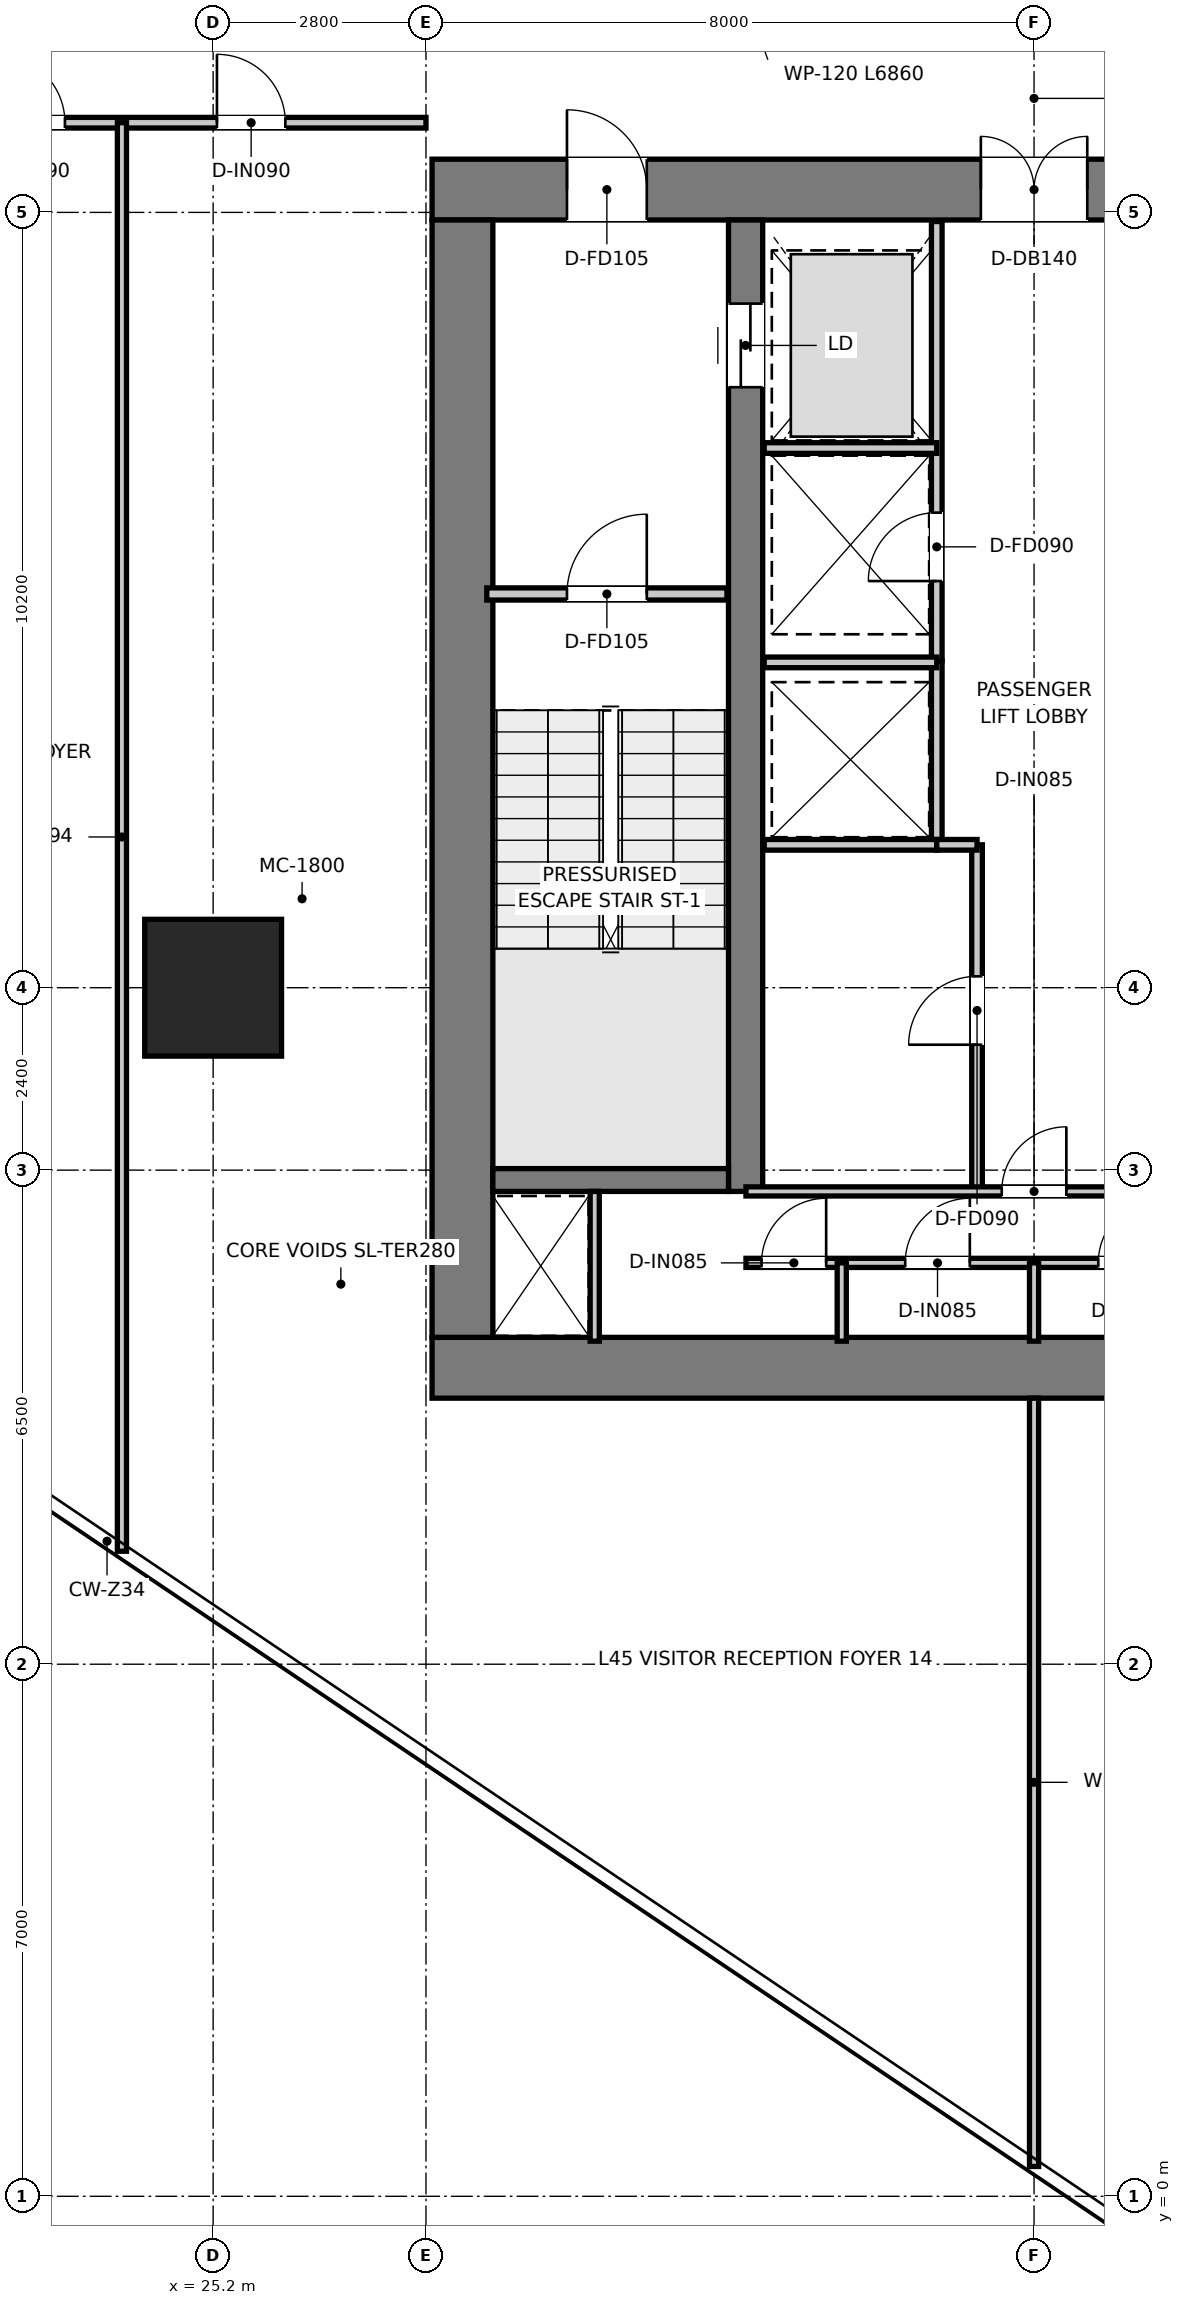
"""IFC4 building model, lengths in metres.
Left out: names, types, materials, properties, quantities, classifications, styles, units other than length and angle.
Written with IfcOpenShell. Run it as: python <this file> out.ifc"""

import sys

from ifc_helpers import new_model, si_unit, direction, frame, frame_2d, origin, origin_2d, place, context, subcontext, project, spatial, rectangle, extrude, source, transform, mapped, element, fill, save


model = new_model("IFC4")
c1 = context("Model", 3, precision=1e-05, world=origin(), true_north=direction((0.0, 1.0)))
c2 = subcontext(c1, "Body", "Model", "MODEL_VIEW")
j1 = project(units=[si_unit("LENGTHUNIT", "METRE"), si_unit("PLANEANGLEUNIT", "RADIAN")], contexts=[c1])
p1 = place(None, origin())
s1 = spatial("IfcSite", under=j1, at=p1, CompositionType="ELEMENT")
p2 = place(p1, origin())
s2 = spatial("IfcBuilding", under=s1, at=p2, CompositionType="ELEMENT")
p3 = place(p2, frame((0.0, 0.0, 185.7)))
s3 = spatial("IfcBuildingStorey", under=s2, at=p3, CompositionType="ELEMENT", Elevation=185.7)
p4 = place(p3, frame((28.08, 10.9, 0.0), z_axis=(0.0, 0.0, 1.0), x_axis=(1.0, 0.0, 0.0)))
e1 = element("IfcWall", 1, at=p4, inside=s3, PredefinedType="SHEAR", context=c2, shape_type="SweptSolid", body=[
    extrude(rectangle(XDim=15.84, YDim=0.8, at=frame_2d((7.92, 0.0))), origin(), (0.0, 0.0, 1.0), 3.95),
])
p5 = place(p3, frame((28.08, 26.4, 0.0), z_axis=(0.0, 0.0, 1.0), x_axis=(1.0, 0.0, 0.0)))
e2 = element("IfcWall", 2, at=p5, inside=s3, PredefinedType="SHEAR", context=c2, shape_type="SweptSolid", body=[
    extrude(rectangle(XDim=15.84, YDim=0.8, at=frame_2d((7.92, 0.0))), origin(), (0.0, 0.0, 1.0), 3.95),
])
p6 = place(p5, frame((7.22, 0.0, 0.0)))
e3 = element("IfcOpeningElement", 3, at=p6, cuts=e2, PredefinedType="OPENING", context=c2, shape_type="SweptSolid", body=[
    extrude(rectangle(XDim=1.4, YDim=2.2, at=frame_2d((0.7, 1.1))), frame((0.0, 0.41, 0.0), z_axis=(0.0, -1.0, 0.0), x_axis=(1.0, 0.0, 0.0)), (0.0, 0.0, 1.0), 0.82),
])
p7 = place(p5, frame((1.775, 0.0, 0.0)))
e4 = element("IfcOpeningElement", 4, at=p7, cuts=e2, PredefinedType="OPENING", context=c2, shape_type="SweptSolid", body=[
    extrude(rectangle(XDim=1.05, YDim=2.1, at=frame_2d((0.525, 1.05))), frame((0.0, 0.41, 0.0), z_axis=(0.0, -1.0, 0.0), x_axis=(1.0, 0.0, 0.0)), (0.0, 0.0, 1.0), 0.82),
])
p8 = place(p5, frame((13.015, 0.0, 0.0)))
e5 = element("IfcOpeningElement", 5, at=p8, cuts=e2, PredefinedType="OPENING", context=c2, shape_type="SweptSolid", body=[
    extrude(rectangle(XDim=1.05, YDim=2.1, at=frame_2d((0.525, 1.05))), frame((0.0, 0.41, 0.0), z_axis=(0.0, -1.0, 0.0), x_axis=(1.0, 0.0, 0.0)), (0.0, 0.0, 1.0), 0.82),
])
p9 = place(p3, frame((28.48, 11.3, 0.0), z_axis=(0.0, 0.0, 1.0), x_axis=(0.0, 1.0, 0.0)))
e6 = element("IfcWall", 6, at=p9, inside=s3, PredefinedType="SHEAR", context=c2, shape_type="SweptSolid", body=[
    extrude(rectangle(XDim=14.7, YDim=0.8, at=frame_2d((7.35, 0.0))), origin(), (0.0, 0.0, 1.0), 3.95),
])
p10 = place(p3, frame((32.205, 13.22, 0.0), z_axis=(0.0, 0.0, 1.0), x_axis=(0.0, 1.0, 0.0)))
e7 = element("IfcWall", 7, at=p10, inside=s3, PredefinedType="SHEAR", context=c2, shape_type="SweptSolid", body=[
    extrude(rectangle(XDim=12.78, YDim=0.45, at=frame_2d((6.39, 0.0))), origin(), (0.0, 0.0, 1.0), 3.95),
])
p11 = place(p10, frame((10.58, 0.0, 0.0)))
e8 = element("IfcOpeningElement", 8, at=p11, cuts=e7, PredefinedType="OPENING", context=c2, shape_type="SweptSolid", body=[
    extrude(rectangle(XDim=1.1, YDim=2.15, at=frame_2d((0.55, 1.075))), frame((0.0, 0.235, 0.0), z_axis=(0.0, -1.0, 0.0), x_axis=(1.0, 0.0, 0.0)), (0.0, 0.0, 1.0), 0.47),
])
p12 = place(p3, frame((28.88, 13.37, 0.0), z_axis=(0.0, 0.0, 1.0), x_axis=(1.0, 0.0, 0.0)))
e9 = element("IfcWall", 9, at=p12, inside=s3, PredefinedType="SHEAR", context=c2, shape_type="SweptSolid", body=[
    extrude(rectangle(XDim=3.1, YDim=0.3, at=frame_2d((1.55, 0.0))), origin(), (0.0, 0.0, 1.0), 3.95),
])
m1 = source(origin(), c2, "Body", "SweptSolid", [
    extrude(rectangle(XDim=1.8, YDim=1.8, at=origin_2d()), origin(), (0.0, 0.0, 1.0), 3.95),
])
p13 = place(p3, frame((25.2, 15.9, 0.0), z_axis=(0.0, 0.0, 1.0), x_axis=(1.0, 0.0, 0.0)))
e10 = element("IfcColumn", 10, at=p13, inside=s3, PredefinedType="USERDEFINED", context=c2, shape_type="MappedRepresentation", body=[
    mapped(m1, transform((0.0, 0.0, 0.0), x_axis=(1.0, 0.0, 0.0), y_axis=(0.0, 1.0, 0.0), z_axis=(0.0, 0.0, 1.0), scale=1.0)),
])
p14 = place(p3, frame((28.8, 21.08, 0.0), z_axis=(0.0, 0.0, 1.0), x_axis=(1.0, 0.0, 0.0)))
e11 = element("IfcWall", 11, at=p14, inside=s3, PredefinedType="PARTITIONING", context=c2, shape_type="SweptSolid", body=[
    extrude(rectangle(XDim=3.16, YDim=0.16, at=frame_2d((1.58, 0.0))), origin(), (0.0, 0.0, 1.0), 3.67),
])
p15 = place(p14, frame((1.055, 0.0, 0.0)))
e12 = element("IfcOpeningElement", 12, at=p15, cuts=e11, PredefinedType="OPENING", context=c2, shape_type="SweptSolid", body=[
    extrude(rectangle(XDim=1.05, YDim=2.1, at=frame_2d((0.525, 1.05))), frame((0.0, 0.09, 0.0), z_axis=(0.0, -1.0, 0.0), x_axis=(1.0, 0.0, 0.0)), (0.0, 0.0, 1.0), 0.18),
])
p16 = place(p3, frame((34.72, 20.2, 0.0), z_axis=(0.0, 0.0, 1.0), x_axis=(0.0, 1.0, 0.0)))
e13 = element("IfcWall", 13, at=p16, inside=s3, PredefinedType="PARTITIONING", context=c2, shape_type="SweptSolid", body=[
    extrude(rectangle(XDim=5.78, YDim=0.14, at=frame_2d((2.89, 0.0))), origin(), (0.0, 0.0, 1.0), 2.67),
])
p17 = place(p16, frame((1.05, 0.0, 0.0)))
e14 = element("IfcOpeningElement", 14, at=p17, cuts=e13, PredefinedType="OPENING", context=c2, shape_type="SweptSolid", body=[
    extrude(rectangle(XDim=0.9, YDim=2.1, at=frame_2d((0.45, 1.05))), frame((0.0, 0.08, 0.0), z_axis=(0.0, -1.0, 0.0), x_axis=(1.0, 0.0, 0.0)), (0.0, 0.0, 1.0), 0.16),
])
p18 = place(p3, frame((32.45, 23.0, 0.0), z_axis=(0.0, 0.0, 1.0), x_axis=(1.0, 0.0, 0.0)))
e15 = element("IfcWall", 15, at=p18, inside=s3, PredefinedType="PARTITIONING", context=c2, shape_type="SweptSolid", body=[
    extrude(rectangle(XDim=2.27, YDim=0.14, at=frame_2d((1.135, 0.0))), origin(), (0.0, 0.0, 1.0), 2.67),
])
p19 = place(p3, frame((34.72, 17.78, 0.0), z_axis=(0.0, 0.0, 1.0), x_axis=(0.0, 1.0, 0.0)))
e16 = element("IfcWall", 16, at=p19, inside=s3, PredefinedType="PARTITIONING", context=c2, shape_type="SweptSolid", body=[
    extrude(rectangle(XDim=2.42, YDim=0.14, at=frame_2d((1.21, 0.0))), origin(), (0.0, 0.0, 1.0), 3.67),
])
for number, where, z_axis, x_axis in (
    (17, (32.45, 17.78, 0.0), (0.0, 0.0, 1.0), (1.0, 0.0, 0.0)),
    (18, (32.45, 20.18, 0.0), (0.0, 0.0, 1.0), (1.0, 0.0, 0.0)),
):
    element("IfcWall", number, at=place(p3, frame(where, z_axis=z_axis, x_axis=x_axis)), inside=s3, PredefinedType="PARTITIONING", context=c2, shape_type="SweptSolid", body=[
        extrude(rectangle(XDim=2.27, YDim=0.14, at=frame_2d((1.135, 0.0))), origin(), (0.0, 0.0, 1.0), 3.67),
    ])
p20 = place(p3, frame((35.25, 13.22, 0.0), z_axis=(0.0, 0.0, 1.0), x_axis=(0.0, 1.0, 0.0)))
e19 = element("IfcWall", 19, at=p20, inside=s3, PredefinedType="PARTITIONING", context=c2, shape_type="SweptSolid", body=[
    extrude(rectangle(XDim=4.56, YDim=0.14, at=frame_2d((2.28, 0.0))), origin(), (0.0, 0.0, 1.0), 3.67),
])
p21 = place(p20, frame((1.93, 0.0, 0.0)))
e20 = element("IfcOpeningElement", 20, at=p21, cuts=e19, PredefinedType="OPENING", context=c2, shape_type="SweptSolid", body=[
    extrude(rectangle(XDim=0.9, YDim=2.1, at=frame_2d((0.45, 1.05))), frame((0.0, 0.08, 0.0), z_axis=(0.0, -1.0, 0.0), x_axis=(1.0, 0.0, 0.0)), (0.0, 0.0, 1.0), 0.16),
])
p22 = place(p3, frame((34.72, 17.78, 0.0), z_axis=(0.0, 0.0, 1.0), x_axis=(1.0, 0.0, 0.0)))
e21 = element("IfcWall", 21, at=p22, inside=s3, PredefinedType="PARTITIONING", context=c2, shape_type="SweptSolid", body=[
    extrude(rectangle(XDim=0.53, YDim=0.14, at=frame_2d((0.265, 0.0))), origin(), (0.0, 0.0, 1.0), 3.67),
])
p23 = place(p3, frame((30.22, 11.25, 0.0), z_axis=(0.0, 0.0, 1.0), x_axis=(0.0, 1.0, 0.0)))
e22 = element("IfcWall", 22, at=p23, inside=s3, PredefinedType="PARTITIONING", context=c2, shape_type="SweptSolid", body=[
    extrude(rectangle(XDim=1.97, YDim=0.12, at=frame_2d((0.985, 0.0))), origin(), (0.0, 0.0, 1.0), 3.67),
])
p24 = place(p3, frame((32.21, 13.22, 0.0), z_axis=(0.0, 0.0, 1.0), x_axis=(1.0, 0.0, 0.0)))
e23 = element("IfcWall", 23, at=p24, inside=s3, PredefinedType="PARTITIONING", context=c2, shape_type="SweptSolid", body=[
    extrude(rectangle(XDim=7.58, YDim=0.12, at=frame_2d((3.79, 0.0))), origin(), (0.0, 0.0, 1.0), 3.67),
])
p25 = place(p24, frame((3.365, 0.0, 0.0)))
e24 = element("IfcOpeningElement", 24, at=p25, cuts=e23, PredefinedType="OPENING", context=c2, shape_type="SweptSolid", body=[
    extrude(rectangle(XDim=0.85, YDim=2.1, at=frame_2d((0.425, 1.05))), frame((0.0, 0.07, 0.0), z_axis=(0.0, -1.0, 0.0), x_axis=(1.0, 0.0, 0.0)), (0.0, 0.0, 1.0), 0.14),
])
p26 = place(p3, frame((32.21, 12.28, 0.0), z_axis=(0.0, 0.0, 1.0), x_axis=(1.0, 0.0, 0.0)))
e25 = element("IfcWall", 25, at=p26, inside=s3, PredefinedType="PARTITIONING", context=c2, shape_type="SweptSolid", body=[
    extrude(rectangle(XDim=7.58, YDim=0.12, at=frame_2d((3.79, 0.0))), origin(), (0.0, 0.0, 1.0), 3.67),
])
p27 = place(p26, frame((0.205, 0.0, 0.0)))
e26 = element("IfcOpeningElement", 26, at=p27, cuts=e25, PredefinedType="OPENING", context=c2, shape_type="SweptSolid", body=[
    extrude(rectangle(XDim=0.85, YDim=2.1, at=frame_2d((0.425, 1.05))), frame((0.0, 0.07, 0.0), z_axis=(0.0, -1.0, 0.0), x_axis=(1.0, 0.0, 0.0)), (0.0, 0.0, 1.0), 0.14),
])
p28 = place(p26, frame((2.095, 0.0, 0.0)))
e27 = element("IfcOpeningElement", 27, at=p28, cuts=e25, PredefinedType="OPENING", context=c2, shape_type="SweptSolid", body=[
    extrude(rectangle(XDim=0.85, YDim=2.1, at=frame_2d((0.425, 1.05))), frame((0.0, 0.07, 0.0), z_axis=(0.0, -1.0, 0.0), x_axis=(1.0, 0.0, 0.0)), (0.0, 0.0, 1.0), 0.14),
])
p29 = place(p26, frame((4.635, 0.0, 0.0)))
e28 = element("IfcOpeningElement", 28, at=p29, cuts=e25, PredefinedType="OPENING", context=c2, shape_type="SweptSolid", body=[
    extrude(rectangle(XDim=0.85, YDim=2.1, at=frame_2d((0.425, 1.05))), frame((0.0, 0.07, 0.0), z_axis=(0.0, -1.0, 0.0), x_axis=(1.0, 0.0, 0.0)), (0.0, 0.0, 1.0), 0.14),
])
p30 = place(p26, frame((6.525, 0.0, 0.0)))
e29 = element("IfcOpeningElement", 29, at=p30, cuts=e25, PredefinedType="OPENING", context=c2, shape_type="SweptSolid", body=[
    extrude(rectangle(XDim=0.85, YDim=2.1, at=frame_2d((0.425, 1.05))), frame((0.0, 0.07, 0.0), z_axis=(0.0, -1.0, 0.0), x_axis=(1.0, 0.0, 0.0)), (0.0, 0.0, 1.0), 0.14),
])
for number, where, z_axis, x_axis in (
    (30, (33.47, 11.25, 0.0), (0.0, 0.0, 1.0), (0.0, 1.0, 0.0)),
    (31, (36.0, 11.25, 0.0), (0.0, 0.0, 1.0), (0.0, 1.0, 0.0)),
):
    element("IfcWall", number, at=place(p3, frame(where, z_axis=z_axis, x_axis=x_axis)), inside=s3, PredefinedType="PARTITIONING", context=c2, shape_type="SweptSolid", body=[
        extrude(rectangle(XDim=1.03, YDim=0.12, at=frame_2d((0.515, 0.0))), origin(), (0.0, 0.0, 1.0), 3.67),
    ])
p31 = place(p3, frame((10.083, 27.28, 0.0), z_axis=(0.0, 0.0, 1.0), x_axis=(1.0, 0.0, 0.0)))
e32 = element("IfcWall", 32, at=p31, inside=s3, PredefinedType="PARTITIONING", context=c2, shape_type="SweptSolid", body=[
    extrude(rectangle(XDim=17.917, YDim=0.14, at=frame_2d((8.958, 0.0))), origin(), (0.0, 0.0, 1.0), 3.03),
])
p32 = place(p31, frame((3.677, 0.0, 0.0)))
e33 = element("IfcOpeningElement", 33, at=p32, cuts=e32, PredefinedType="OPENING", context=c2, shape_type="SweptSolid", body=[
    extrude(rectangle(XDim=0.9, YDim=2.1, at=frame_2d((0.45, 1.05))), frame((0.0, 0.08, 0.0), z_axis=(0.0, -1.0, 0.0), x_axis=(1.0, 0.0, 0.0)), (0.0, 0.0, 1.0), 0.16),
])
p33 = place(p31, frame((12.266, 0.0, 0.0)))
e34 = element("IfcOpeningElement", 34, at=p33, cuts=e32, PredefinedType="OPENING", context=c2, shape_type="SweptSolid", body=[
    extrude(rectangle(XDim=0.9, YDim=2.1, at=frame_2d((0.45, 1.05))), frame((0.0, 0.08, 0.0), z_axis=(0.0, -1.0, 0.0), x_axis=(1.0, 0.0, 0.0)), (0.0, 0.0, 1.0), 0.16),
])
p34 = place(p31, frame((15.167, 0.0, 0.0)))
e35 = element("IfcOpeningElement", 35, at=p34, cuts=e32, PredefinedType="OPENING", context=c2, shape_type="SweptSolid", body=[
    extrude(rectangle(XDim=0.9, YDim=2.1, at=frame_2d((0.45, 1.05))), frame((0.0, 0.08, 0.0), z_axis=(0.0, -1.0, 0.0), x_axis=(1.0, 0.0, 0.0)), (0.0, 0.0, 1.0), 0.16),
])
p35 = place(p3, frame((36.0, 0.392, 0.0), z_axis=(0.0, 0.0, 1.0), x_axis=(0.0, 1.0, 0.0)))
e36 = element("IfcWall", 36, at=p35, inside=s3, PredefinedType="PARTITIONING", context=c2, shape_type="SweptSolid", body=[
    extrude(rectangle(XDim=10.108, YDim=0.12, at=frame_2d((5.054, 0.0))), origin(), (0.0, 0.0, 1.0), 3.67),
])
p36 = place(p3, frame((24.0, 8.487, 0.0), z_axis=(0.0, 0.0, 1.0), x_axis=(0.0, 1.0, 0.0)))
e37 = element("IfcWall", 37, at=p36, inside=s3, PredefinedType="PARTITIONING", context=c2, shape_type="SweptSolid", body=[
    extrude(rectangle(XDim=18.793, YDim=0.12, at=frame_2d((9.397, 0.0))), origin(), (0.0, 0.0, 1.0), 3.08),
])
p37 = place(p15, origin())
e38 = element("IfcDoor", 38, at=p37, inside=s3, OperationType="SINGLE_SWING_RIGHT", PredefinedType="DOOR", context=c2, shape_type="SweptSolid", body=[
    extrude(rectangle(XDim=1.05, YDim=2.1, at=frame_2d((0.525, 1.05))), frame((0.0, 0.025, 0.0), z_axis=(0.0, -1.0, 0.0), x_axis=(1.0, 0.0, 0.0)), (0.0, 0.0, 1.0), 0.05),
])
fill(e12, e38)
p38 = place(p6, origin())
e39 = element("IfcDoor", 39, at=p38, inside=s3, OperationType="DOUBLE_DOOR_SINGLE_SWING", PredefinedType="DOOR", context=c2, shape_type="SweptSolid", body=[
    extrude(rectangle(XDim=1.4, YDim=2.2, at=frame_2d((0.7, 1.1))), frame((0.0, 0.025, 0.0), z_axis=(0.0, -1.0, 0.0), x_axis=(1.0, 0.0, 0.0)), (0.0, 0.0, 1.0), 0.05),
])
fill(e3, e39)
p39 = place(p7, origin())
e40 = element("IfcDoor", 40, at=p39, inside=s3, OperationType="SINGLE_SWING_LEFT", PredefinedType="DOOR", context=c2, shape_type="SweptSolid", body=[
    extrude(rectangle(XDim=1.05, YDim=2.1, at=frame_2d((0.525, 1.05))), frame((0.0, 0.025, 0.0), z_axis=(0.0, -1.0, 0.0), x_axis=(1.0, 0.0, 0.0)), (0.0, 0.0, 1.0), 0.05),
])
fill(e4, e40)
p40 = place(p11, origin())
e41 = element("IfcDoor", 41, at=p40, inside=s3, OperationType="DOUBLE_DOOR_SLIDING", PredefinedType="DOOR", context=c2, shape_type="SweptSolid", body=[
    extrude(rectangle(XDim=1.1, YDim=2.15, at=frame_2d((0.55, 1.075))), frame((0.0, 0.025, 0.0), z_axis=(0.0, -1.0, 0.0), x_axis=(1.0, 0.0, 0.0)), (0.0, 0.0, 1.0), 0.05),
])
fill(e8, e41)
p41 = place(p17, origin())
e42 = element("IfcDoor", 42, at=p41, inside=s3, OperationType="SINGLE_SWING_LEFT", PredefinedType="DOOR", context=c2, shape_type="SweptSolid", body=[
    extrude(rectangle(XDim=0.9, YDim=2.1, at=frame_2d((0.45, 1.05))), frame((0.0, 0.025, 0.0), z_axis=(0.0, -1.0, 0.0), x_axis=(1.0, 0.0, 0.0)), (0.0, 0.0, 1.0), 0.05),
])
fill(e14, e42)
p42 = place(p21, origin())
e43 = element("IfcDoor", 43, at=p42, inside=s3, OperationType="SINGLE_SWING_LEFT", PredefinedType="DOOR", context=c2, shape_type="SweptSolid", body=[
    extrude(rectangle(XDim=0.9, YDim=2.1, at=frame_2d((0.45, 1.05))), frame((0.0, 0.025, 0.0), z_axis=(0.0, -1.0, 0.0), x_axis=(1.0, 0.0, 0.0)), (0.0, 0.0, 1.0), 0.05),
])
fill(e20, e43)
p43 = place(p25, origin())
e44 = element("IfcDoor", 44, at=p43, inside=s3, OperationType="SINGLE_SWING_RIGHT", PredefinedType="DOOR", context=c2, shape_type="SweptSolid", body=[
    extrude(rectangle(XDim=0.85, YDim=2.1, at=frame_2d((0.425, 1.05))), frame((0.0, 0.025, 0.0), z_axis=(0.0, -1.0, 0.0), x_axis=(1.0, 0.0, 0.0)), (0.0, 0.0, 1.0), 0.05),
])
fill(e24, e44)
p44 = place(p27, origin())
e45 = element("IfcDoor", 45, at=p44, inside=s3, OperationType="SINGLE_SWING_RIGHT", PredefinedType="DOOR", context=c2, shape_type="SweptSolid", body=[
    extrude(rectangle(XDim=0.85, YDim=2.1, at=frame_2d((0.425, 1.05))), frame((0.0, 0.025, 0.0), z_axis=(0.0, -1.0, 0.0), x_axis=(1.0, 0.0, 0.0)), (0.0, 0.0, 1.0), 0.05),
])
fill(e26, e45)
p45 = place(p28, origin())
e46 = element("IfcDoor", 46, at=p45, inside=s3, OperationType="SINGLE_SWING_RIGHT", PredefinedType="DOOR", context=c2, shape_type="SweptSolid", body=[
    extrude(rectangle(XDim=0.85, YDim=2.1, at=frame_2d((0.425, 1.05))), frame((0.0, 0.025, 0.0), z_axis=(0.0, -1.0, 0.0), x_axis=(1.0, 0.0, 0.0)), (0.0, 0.0, 1.0), 0.05),
])
fill(e27, e46)
p46 = place(p29, origin())
e47 = element("IfcDoor", 47, at=p46, inside=s3, OperationType="SINGLE_SWING_RIGHT", PredefinedType="DOOR", context=c2, shape_type="SweptSolid", body=[
    extrude(rectangle(XDim=0.85, YDim=2.1, at=frame_2d((0.425, 1.05))), frame((0.0, 0.025, 0.0), z_axis=(0.0, -1.0, 0.0), x_axis=(1.0, 0.0, 0.0)), (0.0, 0.0, 1.0), 0.05),
])
fill(e28, e47)
p47 = place(p33, origin())
e48 = element("IfcDoor", 48, at=p47, inside=s3, OperationType="SINGLE_SWING_LEFT", PredefinedType="DOOR", context=c2, shape_type="SweptSolid", body=[
    extrude(rectangle(XDim=0.9, YDim=2.1, at=frame_2d((0.45, 1.05))), frame((0.0, 0.025, 0.0), z_axis=(0.0, -1.0, 0.0), x_axis=(1.0, 0.0, 0.0)), (0.0, 0.0, 1.0), 0.05),
])
fill(e34, e48)
p48 = place(p34, origin())
e49 = element("IfcDoor", 49, at=p48, inside=s3, OperationType="SINGLE_SWING_LEFT", PredefinedType="DOOR", context=c2, shape_type="SweptSolid", body=[
    extrude(rectangle(XDim=0.9, YDim=2.1, at=frame_2d((0.45, 1.05))), frame((0.0, 0.025, 0.0), z_axis=(0.0, -1.0, 0.0), x_axis=(1.0, 0.0, 0.0)), (0.0, 0.0, 1.0), 0.05),
])
fill(e35, e49)
save(model, sys.argv[1])
